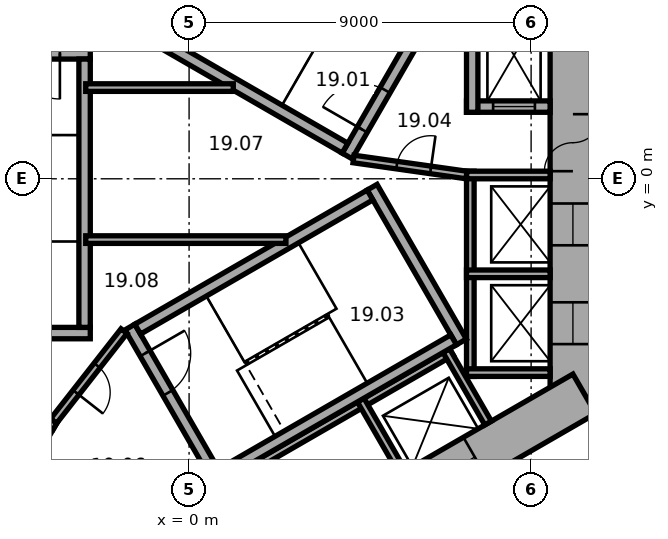
"""IFC4 building model, lengths in metres.
Left out: names, types, materials, properties, quantities, classifications, styles, units other than length and angle.
Written with IfcOpenShell. Run it as: python <this file> out.ifc"""

import sys

from ifc_helpers import new_model, si_unit, direction, frame, frame_2d, origin, place, context, subcontext, project, spatial, rectangle, extrude, element, fill, save


model = new_model("IFC4")
c1 = context("Model", 3, precision=1e-05, world=origin(), true_north=direction((0.0, 1.0)))
c2 = subcontext(c1, "Body", "Model", "MODEL_VIEW")
j1 = project(units=[si_unit("LENGTHUNIT", "METRE"), si_unit("PLANEANGLEUNIT", "RADIAN")], contexts=[c1])
p1 = place(None, origin())
s1 = spatial("IfcSite", under=j1, at=p1, CompositionType="ELEMENT")
p2 = place(p1, origin())
s2 = spatial("IfcBuilding", under=s1, at=p2, CompositionType="ELEMENT")
p3 = place(p2, frame((0.0, 0.0, 86.9)))
s3 = spatial("IfcBuildingStorey", under=s2, at=p3, CompositionType="ELEMENT", Elevation=86.9)
p4 = place(p3, frame((10.1, -6.177, 0.0), z_axis=(0.0, 0.0, 1.0), x_axis=(0.0, 1.0, 0.0)))
e1 = element("IfcWall", 1, at=p4, inside=s3, PredefinedType="SHEAR", context=c2, shape_type="SweptSolid", body=[
    extrude(rectangle(XDim=12.355, YDim=1.2, at=frame_2d((6.177, 0.0))), origin(), (0.0, 0.0, 1.0), 3.3),
])
p5 = place(p4, frame((6.378, 0.0, 0.0)))
e2 = element("IfcOpeningElement", 2, at=p5, cuts=e1, PredefinedType="OPENING", context=c2, shape_type="SweptSolid", body=[
    extrude(rectangle(XDim=1.5, YDim=2.1, at=frame_2d((0.75, 1.05))), frame((0.0, 0.61, 0.0), z_axis=(0.0, -1.0, 0.0), x_axis=(1.0, 0.0, 0.0)), (0.0, 0.0, 1.0), 1.22),
])
p6 = place(p4, frame((1.828, 0.0, 0.0)))
e3 = element("IfcOpeningElement", 3, at=p6, cuts=e1, PredefinedType="OPENING", context=c2, shape_type="SweptSolid", body=[
    extrude(rectangle(XDim=1.1, YDim=2.1, at=frame_2d((0.55, 1.05))), frame((0.0, 0.61, 0.0), z_axis=(0.0, -1.0, 0.0), x_axis=(1.0, 0.0, 0.0)), (0.0, 0.0, 1.0), 1.22),
])
p7 = place(p4, frame((4.427, 0.0, 0.0)))
e4 = element("IfcOpeningElement", 4, at=p7, cuts=e1, PredefinedType="OPENING", context=c2, shape_type="SweptSolid", body=[
    extrude(rectangle(XDim=1.1, YDim=2.1, at=frame_2d((0.55, 1.05))), frame((0.0, 0.61, 0.0), z_axis=(0.0, -1.0, 0.0), x_axis=(1.0, 0.0, 0.0)), (0.0, 0.0, 1.0), 1.22),
])
p8 = place(p3, frame((-10.4, -5.658, 0.0), z_axis=(0.0, 0.0, 1.0), x_axis=(0.866021384402, -0.500006961711, 0.0)))
e5 = element("IfcWall", 5, at=p8, inside=s3, PredefinedType="SHEAR", context=c2, shape_type="SweptSolid", body=[
    extrude(rectangle(XDim=12.355, YDim=1.2, at=frame_2d((6.178, 0.0))), origin(), (0.0, 0.0, 1.0), 3.3),
])
p9 = place(p8, frame((6.378, 0.0, 0.0)))
e6 = element("IfcOpeningElement", 6, at=p9, cuts=e5, PredefinedType="OPENING", context=c2, shape_type="SweptSolid", body=[
    extrude(rectangle(XDim=1.5, YDim=2.1, at=frame_2d((0.75, 1.05))), frame((0.0, 0.61, 0.0), z_axis=(0.0, -1.0, 0.0), x_axis=(1.0, 0.0, 0.0)), (0.0, 0.0, 1.0), 1.22),
])
p10 = place(p8, frame((3.228, 0.0, 0.0)))
e7 = element("IfcOpeningElement", 7, at=p10, cuts=e5, PredefinedType="OPENING", context=c2, shape_type="SweptSolid", body=[
    extrude(rectangle(XDim=0.9, YDim=2.1, at=frame_2d((0.45, 1.05))), frame((0.0, 0.61, 0.0), z_axis=(0.0, -1.0, 0.0), x_axis=(1.0, 0.0, 0.0)), (0.0, 0.0, 1.0), 1.22),
])
p11 = place(p3, frame((-0.3, -11.836, 0.0), z_axis=(0.0, 0.0, 1.0), x_axis=(0.866021384402, 0.500006961711, 0.0)))
e8 = element("IfcWall", 8, at=p11, inside=s3, PredefinedType="SHEAR", context=c2, shape_type="SweptSolid", body=[
    extrude(rectangle(XDim=12.355, YDim=1.2, at=frame_2d((6.178, 0.0))), origin(), (0.0, 0.0, 1.0), 3.3),
])
p12 = place(p11, frame((4.128, 0.0, 0.0)))
e9 = element("IfcOpeningElement", 9, at=p12, cuts=e8, PredefinedType="OPENING", context=c2, shape_type="SweptSolid", body=[
    extrude(rectangle(XDim=0.9, YDim=2.1, at=frame_2d((0.45, 1.05))), frame((0.0, 0.61, 0.0), z_axis=(0.0, -1.0, 0.0), x_axis=(1.0, 0.0, 0.0)), (0.0, 0.0, 1.0), 1.22),
])
p13 = place(p11, frame((7.928, 0.0, 0.0)))
e10 = element("IfcOpeningElement", 10, at=p13, cuts=e8, PredefinedType="OPENING", context=c2, shape_type="SweptSolid", body=[
    extrude(rectangle(XDim=1.1, YDim=2.1, at=frame_2d((0.55, 1.05))), frame((0.0, 0.61, 0.0), z_axis=(0.0, -1.0, 0.0), x_axis=(1.0, 0.0, 0.0)), (0.0, 0.0, 1.0), 1.22),
])
p14 = place(p3, frame((7.4, -5.2, 0.0), z_axis=(0.0, 0.0, 1.0), x_axis=(0.0, 1.0, 0.0)))
e11 = element("IfcWall", 11, at=p14, inside=s3, PredefinedType="PARTITIONING", context=c2, shape_type="SweptSolid", body=[
    extrude(rectangle(XDim=5.4, YDim=0.2, at=frame_2d((2.7, 0.0))), origin(), (0.0, 0.0, 1.0), 3.05),
])
for number, where, z_axis, x_axis in (
    (12, (7.3, -5.1, 0.0), (0.0, 0.0, 1.0), (1.0, 0.0, 0.0)),
    (13, (7.3, -2.5, 0.0), (0.0, 0.0, 1.0), (1.0, 0.0, 0.0)),
    (14, (7.3, 0.1, 0.0), (0.0, 0.0, 1.0), (1.0, 0.0, 0.0)),
):
    element("IfcWall", number, at=place(p3, frame(where, z_axis=z_axis, x_axis=x_axis)), inside=s3, PredefinedType="PARTITIONING", context=c2, shape_type="SweptSolid", body=[
        extrude(rectangle(XDim=2.2, YDim=0.2, at=frame_2d((1.1, 0.0))), origin(), (0.0, 0.0, 1.0), 3.05),
    ])
p15 = place(p3, frame((-8.203, -3.809, 0.0), z_axis=(0.0, 0.0, 1.0), x_axis=(0.866028230842, -0.499995103361, 0.0)))
e15 = element("IfcWall", 15, at=p15, inside=s3, PredefinedType="PARTITIONING", context=c2, shape_type="SweptSolid", body=[
    extrude(rectangle(XDim=5.4, YDim=0.2, at=frame_2d((2.7, 0.0))), origin(), (0.0, 0.0, 1.0), 3.05),
])
p16 = place(p3, frame((-3.563, -6.372, 0.0), z_axis=(0.0, 0.0, 1.0), x_axis=(-0.499994660107, -0.866028486751, 0.0)))
e16 = element("IfcWall", 16, at=p16, inside=s3, PredefinedType="PARTITIONING", context=c2, shape_type="SweptSolid", body=[
    extrude(rectangle(XDim=2.2, YDim=0.2, at=frame_2d((1.1, 0.0))), origin(), (0.0, 0.0, 1.0), 3.05),
])
p17 = place(p3, frame((-0.024, -8.559, 0.0), z_axis=(0.0, 0.0, 1.0), x_axis=(0.866026010844, 0.49999894854, 0.0)))
e17 = element("IfcWall", 17, at=p17, inside=s3, PredefinedType="PARTITIONING", context=c2, shape_type="SweptSolid", body=[
    extrude(rectangle(XDim=8.0, YDim=0.2, at=frame_2d((4.0, 0.0))), origin(), (0.0, 0.0, 1.0), 3.05),
])
for number, where, z_axis, x_axis in (
    (18, (4.516, -5.822, 0.0), (0.0, 0.0, 1.0), (0.5, -0.866, 0.0)),
    (19, (6.768, -4.522, 0.0), (0.0, 0.0, 1.0), (0.5, -0.866, 0.0)),
):
    element("IfcWall", number, at=place(p3, frame(where, z_axis=z_axis, x_axis=x_axis)), inside=s3, PredefinedType="PARTITIONING", context=c2, shape_type="SweptSolid", body=[
        extrude(rectangle(XDim=2.2, YDim=0.2, at=frame_2d((1.1, 0.0))), origin(), (0.0, 0.0, 1.0), 3.05),
    ])
p18 = place(p3, frame((4.158, 0.602, 0.0), z_axis=(0.0, 0.0, 1.0), x_axis=(0.499977259774, 0.866038532462, 0.0)))
e20 = element("IfcWall", 20, at=p18, inside=s3, PredefinedType="SHEAR", context=c2, shape_type="SweptSolid", body=[
    extrude(rectangle(XDim=4.7, YDim=0.3, at=frame_2d((2.35, 0.0))), origin(), (0.0, 0.0, 1.0), 3.05),
])
p19 = place(p18, frame((0.8, 0.0, 0.0)))
e21 = element("IfcOpeningElement", 21, at=p19, cuts=e20, PredefinedType="OPENING", context=c2, shape_type="SweptSolid", body=[
    extrude(rectangle(XDim=1.2, YDim=2.1, at=frame_2d((0.6, 1.05))), frame((0.0, 0.16, 0.0), z_axis=(0.0, -1.0, 0.0), x_axis=(1.0, 0.0, 0.0)), (0.0, 0.0, 1.0), 0.32),
])
p20 = place(p3, frame((4.103, 0.807, 0.0), z_axis=(0.0, 0.0, 1.0), x_axis=(-0.866027801685, 0.499995846692, 0.0)))
e22 = element("IfcWall", 22, at=p20, inside=s3, PredefinedType="SHEAR", context=c2, shape_type="SweptSolid", body=[
    extrude(rectangle(XDim=7.06, YDim=0.3, at=frame_2d((3.53, 0.0))), origin(), (0.0, 0.0, 1.0), 3.05),
])
p21 = place(p3, frame((-2.6, 3.3, 0.0), z_axis=(0.0, 0.0, 1.0), x_axis=(-1.0, 0.0, 0.0)))
e23 = element("IfcWall", 23, at=p21, inside=s3, PredefinedType="SHEAR", context=c2, shape_type="SweptSolid", body=[
    extrude(rectangle(XDim=4.7, YDim=0.3, at=frame_2d((2.35, 0.0))), origin(), (0.0, 0.0, 1.0), 3.05),
])
p22 = place(p21, frame((0.8, 0.0, 0.0)))
e24 = element("IfcOpeningElement", 24, at=p22, cuts=e23, PredefinedType="OPENING", context=c2, shape_type="SweptSolid", body=[
    extrude(rectangle(XDim=1.2, YDim=2.1, at=frame_2d((0.6, 1.05))), frame((0.0, 0.16, 0.0), z_axis=(0.0, -1.0, 0.0), x_axis=(1.0, 0.0, 0.0)), (0.0, 0.0, 1.0), 0.32),
])
p23 = place(p3, frame((-2.6, -4.06, 0.0), z_axis=(0.0, 0.0, 1.0), x_axis=(-1.0, 0.0, 0.0)))
e25 = element("IfcWall", 25, at=p23, inside=s3, PredefinedType="SHEAR", context=c2, shape_type="SweptSolid", body=[
    extrude(rectangle(XDim=4.7, YDim=0.3, at=frame_2d((2.35, 0.0))), origin(), (0.0, 0.0, 1.0), 3.05),
])
p24 = place(p3, frame((-2.75, 3.15, 0.0), z_axis=(0.0, 0.0, 1.0), x_axis=(0.0, -1.0, 0.0)))
e26 = element("IfcWall", 26, at=p24, inside=s3, PredefinedType="SHEAR", context=c2, shape_type="SweptSolid", body=[
    extrude(rectangle(XDim=7.06, YDim=0.3, at=frame_2d((3.53, 0.0))), origin(), (0.0, 0.0, 1.0), 3.05),
])
p25 = place(p3, frame((-1.558, -3.902, 0.0), z_axis=(0.0, 0.0, 1.0), x_axis=(0.499977259774, -0.866038532462, 0.0)))
e27 = element("IfcWall", 27, at=p25, inside=s3, PredefinedType="SHEAR", context=c2, shape_type="SweptSolid", body=[
    extrude(rectangle(XDim=4.7, YDim=0.3, at=frame_2d((2.35, 0.0))), origin(), (0.0, 0.0, 1.0), 3.05),
])
p26 = place(p25, frame((0.8, 0.0, 0.0)))
e28 = element("IfcOpeningElement", 28, at=p26, cuts=e27, PredefinedType="OPENING", context=c2, shape_type="SweptSolid", body=[
    extrude(rectangle(XDim=1.2, YDim=2.1, at=frame_2d((0.6, 1.05))), frame((0.0, 0.16, 0.0), z_axis=(0.0, -1.0, 0.0), x_axis=(1.0, 0.0, 0.0)), (0.0, 0.0, 1.0), 0.32),
])
p27 = place(p3, frame((4.816, -0.222, 0.0), z_axis=(0.0, 0.0, 1.0), x_axis=(0.499977259774, -0.866038532462, 0.0)))
e29 = element("IfcWall", 29, at=p27, inside=s3, PredefinedType="SHEAR", context=c2, shape_type="SweptSolid", body=[
    extrude(rectangle(XDim=4.7, YDim=0.3, at=frame_2d((2.35, 0.0))), origin(), (0.0, 0.0, 1.0), 3.05),
])
for number, where, z_axis, x_axis in (
    (30, (-1.353, -3.957, 0.0), (0.0, 0.0, 1.0), (0.866, 0.5, 0.0)),
    (31, (0.847, -7.767, 0.0), (0.0, 0.0, 1.0), (0.866, 0.5, 0.0)),
):
    element("IfcWall", number, at=place(p3, frame(where, z_axis=z_axis, x_axis=x_axis)), inside=s3, PredefinedType="SHEAR", context=c2, shape_type="SweptSolid", body=[
        extrude(rectangle(XDim=7.06, YDim=0.3, at=frame_2d((3.53, 0.0))), origin(), (0.0, 0.0, 1.0), 3.05),
    ])
p28 = place(p3, frame((7.3, 1.9, 0.0), z_axis=(0.0, 0.0, 1.0), x_axis=(1.0, 0.0, 0.0)))
e32 = element("IfcWall", 32, at=p28, inside=s3, PredefinedType="SHEAR", context=c2, shape_type="SweptSolid", body=[
    extrude(rectangle(XDim=2.2, YDim=0.3, at=frame_2d((1.1, 0.0))), origin(), (0.0, 0.0, 1.0), 3.05),
])
p29 = place(p28, frame((0.7, 0.0, 0.0)))
e33 = element("IfcOpeningElement", 33, at=p29, cuts=e32, PredefinedType="OPENING", context=c2, shape_type="SweptSolid", body=[
    extrude(rectangle(XDim=1.1, YDim=2.1, at=frame_2d((0.55, 1.05))), frame((0.0, 0.16, 0.0), z_axis=(0.0, -1.0, 0.0), x_axis=(1.0, 0.0, 0.0)), (0.0, 0.0, 1.0), 0.32),
])
p30 = place(p3, frame((7.45, 1.75, 0.0), z_axis=(0.0, 0.0, 1.0), x_axis=(0.0, 1.0, 0.0)))
e34 = element("IfcWall", 34, at=p30, inside=s3, PredefinedType="SHEAR", context=c2, shape_type="SweptSolid", body=[
    extrude(rectangle(XDim=3.35, YDim=0.3, at=frame_2d((1.675, 0.0))), origin(), (0.0, 0.0, 1.0), 3.05),
])
p31 = place(p3, frame((4.327, 0.521, 0.0), z_axis=(0.0, 0.0, 1.0), x_axis=(0.990124376366, -0.14019172346, 0.0)))
e35 = element("IfcWall", 35, at=p31, inside=s3, PredefinedType="PARTITIONING", context=c2, shape_type="SweptSolid", body=[
    extrude(rectangle(XDim=3.002, YDim=0.2, at=frame_2d((1.501, 0.0))), origin(), (0.0, 0.0, 1.0), 3.05),
])
p32 = place(p31, frame((1.15, 0.0, 0.0)))
e36 = element("IfcOpeningElement", 36, at=p32, cuts=e35, PredefinedType="OPENING", context=c2, shape_type="SweptSolid", body=[
    extrude(rectangle(XDim=0.9, YDim=2.1, at=frame_2d((0.45, 1.05))), frame((0.0, 0.11, 0.0), z_axis=(0.0, -1.0, 0.0), x_axis=(1.0, 0.0, 0.0)), (0.0, 0.0, 1.0), 0.22),
])
p33 = place(p3, frame((-1.712, -4.008, 0.0), z_axis=(0.0, 0.0, 1.0), x_axis=(-0.616549420702, -0.787316208287, 0.0)))
e37 = element("IfcWall", 37, at=p33, inside=s3, PredefinedType="PARTITIONING", context=c2, shape_type="SweptSolid", body=[
    extrude(rectangle(XDim=3.002, YDim=0.2, at=frame_2d((1.501, 0.0))), origin(), (0.0, 0.0, 1.0), 3.05),
])
p34 = place(p33, frame((1.15, 0.0, 0.0)))
e38 = element("IfcOpeningElement", 38, at=p34, cuts=e37, PredefinedType="OPENING", context=c2, shape_type="SweptSolid", body=[
    extrude(rectangle(XDim=0.9, YDim=2.1, at=frame_2d((0.45, 1.05))), frame((0.0, 0.11, 0.0), z_axis=(0.0, -1.0, 0.0), x_axis=(1.0, 0.0, 0.0)), (0.0, 0.0, 1.0), 0.22),
])
p35 = place(p3, frame((-2.72, -1.6, 0.0), z_axis=(0.0, 0.0, 1.0), x_axis=(1.0, 0.0, 0.0)))
e39 = element("IfcWall", 39, at=p35, inside=s3, PredefinedType="PARTITIONING", context=c2, shape_type="SweptSolid", body=[
    extrude(rectangle(XDim=5.269, YDim=0.2, at=frame_2d((2.634, 0.0))), origin(), (0.0, 0.0, 1.0), 3.05),
])
p36 = place(p3, frame((-2.72, 2.4, 0.0), z_axis=(0.0, 0.0, 1.0), x_axis=(1.0, 0.0, 0.0)))
e40 = element("IfcWall", 40, at=p36, inside=s3, PredefinedType="PARTITIONING", context=c2, shape_type="SweptSolid", body=[
    extrude(rectangle(XDim=3.883, YDim=0.2, at=frame_2d((1.941, 0.0))), origin(), (0.0, 0.0, 1.0), 3.05),
])
p37 = place(p5, origin())
e41 = element("IfcDoor", 41, at=p37, inside=s3, OperationType="DOUBLE_DOOR_SINGLE_SWING", PredefinedType="DOOR", context=c2, shape_type="SweptSolid", body=[
    extrude(rectangle(XDim=1.5, YDim=2.1, at=frame_2d((0.75, 1.05))), frame((0.0, 0.025, 0.0), z_axis=(0.0, -1.0, 0.0), x_axis=(1.0, 0.0, 0.0)), (0.0, 0.0, 1.0), 0.05),
])
fill(e2, e41)
p38 = place(p19, origin())
e42 = element("IfcDoor", 42, at=p38, inside=s3, OperationType="SINGLE_SWING_RIGHT", PredefinedType="DOOR", context=c2, shape_type="SweptSolid", body=[
    extrude(rectangle(XDim=1.2, YDim=2.1, at=frame_2d((0.6, 1.05))), frame((0.0, 0.025, 0.0), z_axis=(0.0, -1.0, 0.0), x_axis=(1.0, 0.0, 0.0)), (0.0, 0.0, 1.0), 0.05),
])
fill(e21, e42)
p39 = place(p22, origin())
e43 = element("IfcDoor", 43, at=p39, inside=s3, OperationType="SINGLE_SWING_RIGHT", PredefinedType="DOOR", context=c2, shape_type="SweptSolid", body=[
    extrude(rectangle(XDim=1.2, YDim=2.1, at=frame_2d((0.6, 1.05))), frame((0.0, 0.025, 0.0), z_axis=(0.0, -1.0, 0.0), x_axis=(1.0, 0.0, 0.0)), (0.0, 0.0, 1.0), 0.05),
])
fill(e24, e43)
p40 = place(p26, origin())
e44 = element("IfcDoor", 44, at=p40, inside=s3, OperationType="SINGLE_SWING_RIGHT", PredefinedType="DOOR", context=c2, shape_type="SweptSolid", body=[
    extrude(rectangle(XDim=1.2, YDim=2.1, at=frame_2d((0.6, 1.05))), frame((0.0, 0.025, 0.0), z_axis=(0.0, -1.0, 0.0), x_axis=(1.0, 0.0, 0.0)), (0.0, 0.0, 1.0), 0.05),
])
fill(e28, e44)
p41 = place(p32, origin())
e45 = element("IfcDoor", 45, at=p41, inside=s3, OperationType="SINGLE_SWING_LEFT", PredefinedType="DOOR", context=c2, shape_type="SweptSolid", body=[
    extrude(rectangle(XDim=0.9, YDim=2.1, at=frame_2d((0.45, 1.05))), frame((0.0, 0.025, 0.0), z_axis=(0.0, -1.0, 0.0), x_axis=(1.0, 0.0, 0.0)), (0.0, 0.0, 1.0), 0.05),
])
fill(e36, e45)
p42 = place(p34, origin())
e46 = element("IfcDoor", 46, at=p42, inside=s3, OperationType="SINGLE_SWING_LEFT", PredefinedType="DOOR", context=c2, shape_type="SweptSolid", body=[
    extrude(rectangle(XDim=0.9, YDim=2.1, at=frame_2d((0.45, 1.05))), frame((0.0, 0.025, 0.0), z_axis=(0.0, -1.0, 0.0), x_axis=(1.0, 0.0, 0.0)), (0.0, 0.0, 1.0), 0.05),
])
fill(e38, e46)
p43 = place(p29, origin())
e47 = element("IfcDoor", 47, at=p43, inside=s3, OperationType="DOUBLE_DOOR_SLIDING", PredefinedType="DOOR", context=c2, shape_type="SweptSolid", body=[
    extrude(rectangle(XDim=1.1, YDim=2.1, at=frame_2d((0.55, 1.05))), frame((0.0, 0.025, 0.0), z_axis=(0.0, -1.0, 0.0), x_axis=(1.0, 0.0, 0.0)), (0.0, 0.0, 1.0), 0.05),
])
fill(e33, e47)
p44 = place(p6, origin())
e48 = element("IfcDoor", 48, at=p44, inside=s3, OperationType="DOUBLE_DOOR_SLIDING", PredefinedType="DOOR", context=c2, shape_type="SweptSolid", body=[
    extrude(rectangle(XDim=1.1, YDim=2.1, at=frame_2d((0.55, 1.05))), frame((0.0, 0.025, 0.0), z_axis=(0.0, -1.0, 0.0), x_axis=(1.0, 0.0, 0.0)), (0.0, 0.0, 1.0), 0.05),
])
fill(e3, e48)
p45 = place(p7, origin())
e49 = element("IfcDoor", 49, at=p45, inside=s3, OperationType="DOUBLE_DOOR_SLIDING", PredefinedType="DOOR", context=c2, shape_type="SweptSolid", body=[
    extrude(rectangle(XDim=1.1, YDim=2.1, at=frame_2d((0.55, 1.05))), frame((0.0, 0.025, 0.0), z_axis=(0.0, -1.0, 0.0), x_axis=(1.0, 0.0, 0.0)), (0.0, 0.0, 1.0), 0.05),
])
fill(e4, e49)
p46 = place(p13, origin())
e50 = element("IfcDoor", 50, at=p46, inside=s3, OperationType="DOUBLE_DOOR_SLIDING", PredefinedType="DOOR", context=c2, shape_type="SweptSolid", body=[
    extrude(rectangle(XDim=1.1, YDim=2.1, at=frame_2d((0.55, 1.05))), frame((0.0, 0.025, 0.0), z_axis=(0.0, -1.0, 0.0), x_axis=(1.0, 0.0, 0.0)), (0.0, 0.0, 1.0), 0.05),
])
fill(e10, e50)
save(model, sys.argv[1])
